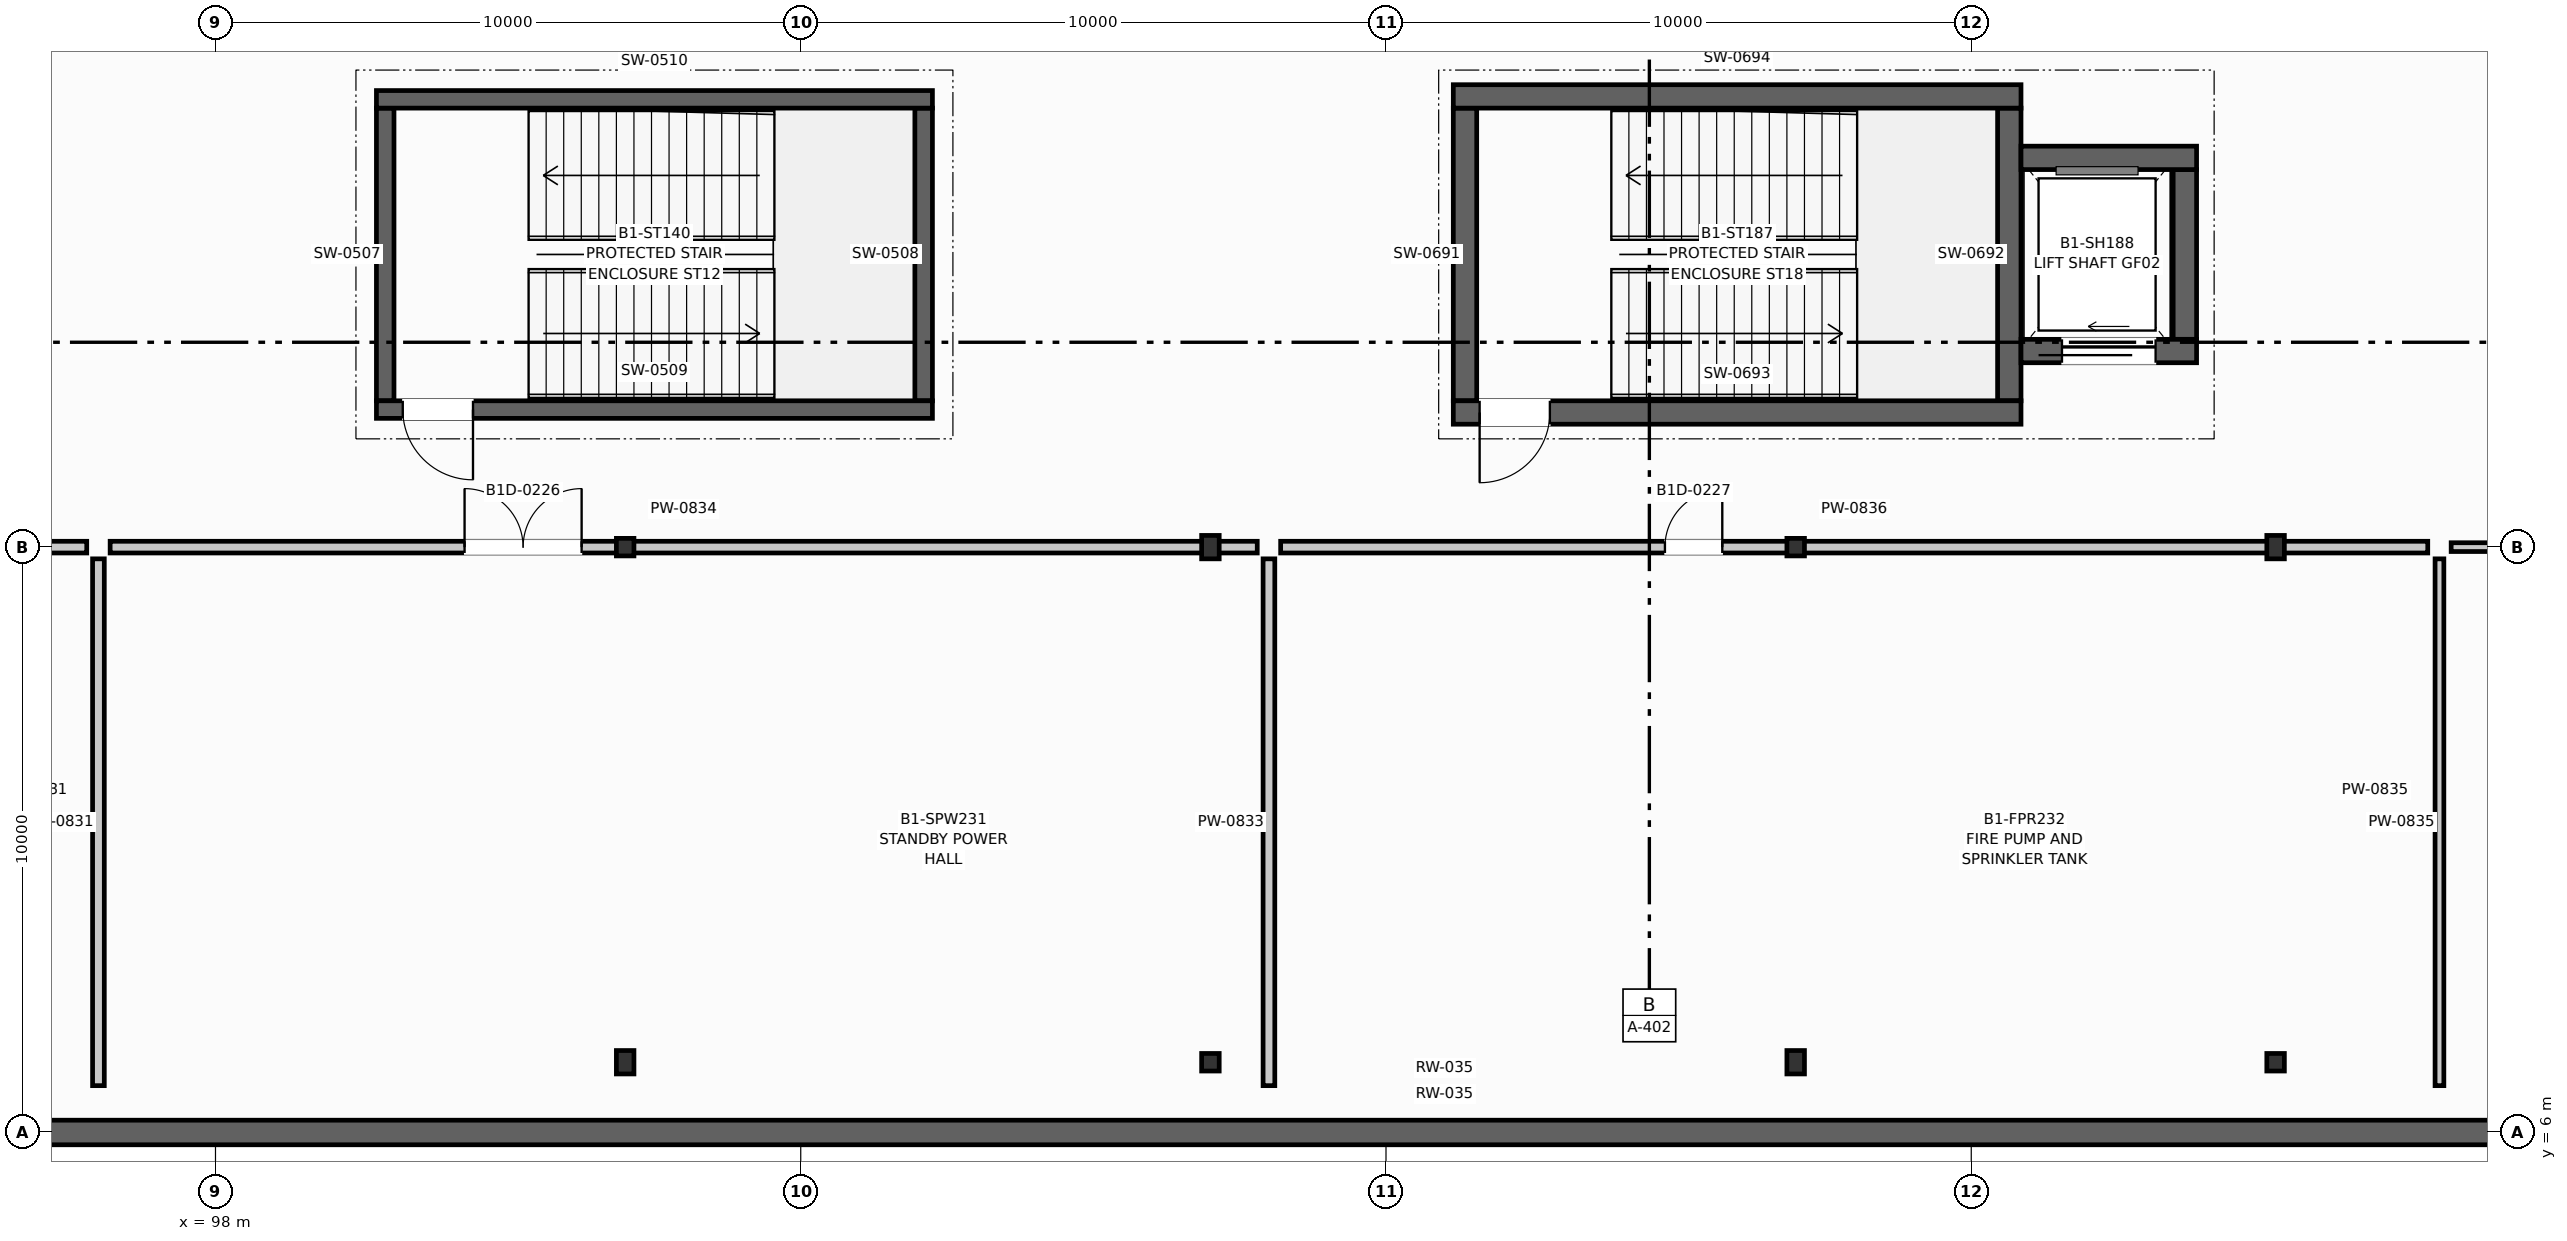
"""IFC4 building model, lengths in metres.
Left out: names, types, materials, properties, quantities, classifications, styles, units other than length and angle.
Written with IfcOpenShell. Run it as: python <this file> out.ifc"""

import sys

from ifc_helpers import new_model, si_unit, direction, frame, frame_2d, origin, origin_2d, place, context, subcontext, project, spatial, rectangle, i_section, extrude, element, fill, save


model = new_model("IFC4")
c1 = context("Model", 3, precision=1e-05, world=origin(), true_north=direction((0.0, 1.0)))
c2 = subcontext(c1, "Body", "Model", "MODEL_VIEW")
j1 = project(units=[si_unit("LENGTHUNIT", "METRE"), si_unit("PLANEANGLEUNIT", "RADIAN")], contexts=[c1])
p1 = place(None, origin())
s1 = spatial("IfcSite", under=j1, at=p1, CompositionType="ELEMENT")
p2 = place(p1, origin())
s2 = spatial("IfcBuilding", under=s1, at=p2, CompositionType="ELEMENT")
p3 = place(p2, frame((0.0, 0.0, -4.5)))
s3 = spatial("IfcBuildingStorey", under=s2, at=p3, CompositionType="ELEMENT", Elevation=-4.5)
p4 = place(p3, frame((105.0, 7.2, -0.55), z_axis=(0.0, 0.0, 1.0), x_axis=(1.0, 0.0, 0.0)))
e1 = element("IfcColumn", 1, at=p4, inside=s3, PredefinedType="COLUMN", context=c2, shape_type="SweptSolid", body=[
    extrude(i_section(OverallWidth=0.3, OverallDepth=0.4, WebThickness=0.013, FlangeThickness=0.024, at=origin_2d()), origin(), (0.0, 0.0, 1.0), 5.05),
])
for number, where, z_axis, x_axis in (
    (2, (105.0, 16.0, -0.55), (0.0, 0.0, 1.0), (1.0, 0.0, 0.0)),
    (3, (115.0, 7.2, -0.55), (0.0, 0.0, 1.0), (1.0, 0.0, 0.0)),
):
    element("IfcColumn", number, at=place(p3, frame(where, z_axis=z_axis, x_axis=x_axis)), inside=s3, PredefinedType="COLUMN", context=c2, shape_type="SweptSolid", body=[
        extrude(i_section(OverallWidth=0.3, OverallDepth=0.3, WebThickness=0.011, FlangeThickness=0.019, at=origin_2d()), origin(), (0.0, 0.0, 1.0), 5.05),
    ])
for number, where, z_axis, x_axis in (
    (4, (115.0, 16.0, -0.55), (0.0, 0.0, 1.0), (1.0, 0.0, 0.0)),
    (5, (125.0, 7.2, -0.55), (0.0, 0.0, 1.0), (1.0, 0.0, 0.0)),
):
    element("IfcColumn", number, at=place(p3, frame(where, z_axis=z_axis, x_axis=x_axis)), inside=s3, PredefinedType="COLUMN", context=c2, shape_type="SweptSolid", body=[
        extrude(i_section(OverallWidth=0.3, OverallDepth=0.4, WebThickness=0.013, FlangeThickness=0.024, at=origin_2d()), origin(), (0.0, 0.0, 1.0), 5.05),
    ])
for number, where, z_axis, x_axis in (
    (6, (125.0, 16.0, -0.55), (0.0, 0.0, 1.0), (1.0, 0.0, 0.0)),
    (7, (133.2, 7.2, -0.55), (0.0, 0.0, 1.0), (1.0, 0.0, 0.0)),
):
    element("IfcColumn", number, at=place(p3, frame(where, z_axis=z_axis, x_axis=x_axis)), inside=s3, PredefinedType="COLUMN", context=c2, shape_type="SweptSolid", body=[
        extrude(i_section(OverallWidth=0.3, OverallDepth=0.3, WebThickness=0.011, FlangeThickness=0.019, at=origin_2d()), origin(), (0.0, 0.0, 1.0), 5.05),
    ])
p5 = place(p3, frame((133.2, 16.0, -0.55), z_axis=(0.0, 0.0, 1.0), x_axis=(1.0, 0.0, 0.0)))
e8 = element("IfcColumn", 8, at=p5, inside=s3, PredefinedType="COLUMN", context=c2, shape_type="SweptSolid", body=[
    extrude(i_section(OverallWidth=0.3, OverallDepth=0.4, WebThickness=0.013, FlangeThickness=0.024, at=origin_2d()), origin(), (0.0, 0.0, 1.0), 5.05),
])
p6 = place(p3, frame((74.0, 6.0, 0.0), z_axis=(0.0, 0.0, 1.0), x_axis=(1.0, 0.0, 0.0)))
e9 = element("IfcWall", 9, at=p6, inside=s3, PredefinedType="USERDEFINED", context=c2, shape_type="SweptSolid", body=[
    extrude(rectangle(XDim=90.0, YDim=0.42, at=frame_2d((45.0, 0.0))), origin(), (0.0, 0.0, 1.0), 4.2),
])
for number, where, z_axis, x_axis in (
    (10, (100.9, 18.5, 0.0), (0.0, 0.0, 1.0), (0.0, 1.0, 0.0)),
    (11, (110.1, 18.5, 0.0), (0.0, 0.0, 1.0), (0.0, 1.0, 0.0)),
):
    element("IfcWall", number, at=place(p3, frame(where, z_axis=z_axis, x_axis=x_axis)), inside=s3, PredefinedType="SHEAR", context=c2, shape_type="SweptSolid", body=[
        extrude(rectangle(XDim=5.0, YDim=0.3, at=frame_2d((2.5, 0.0))), origin(), (0.0, 0.0, 1.0), 4.2),
    ])
p7 = place(p3, frame((100.75, 18.35, 0.0), z_axis=(0.0, 0.0, 1.0), x_axis=(1.0, 0.0, 0.0)))
e12 = element("IfcWall", 12, at=p7, inside=s3, PredefinedType="SHEAR", context=c2, shape_type="SweptSolid", body=[
    extrude(rectangle(XDim=9.5, YDim=0.3, at=frame_2d((4.75, 0.0))), origin(), (0.0, 0.0, 1.0), 4.2),
])
p8 = place(p7, frame((0.45, 0.0, 0.0)))
e13 = element("IfcOpeningElement", 13, at=p8, cuts=e12, PredefinedType="OPENING", context=c2, shape_type="SweptSolid", body=[
    extrude(rectangle(XDim=1.2, YDim=2.2, at=frame_2d((0.6, 1.1))), frame((0.0, 0.16, 0.0), z_axis=(0.0, -1.0, 0.0), x_axis=(1.0, 0.0, 0.0)), (0.0, 0.0, 1.0), 0.32),
])
p9 = place(p3, frame((100.75, 23.65, 0.0), z_axis=(0.0, 0.0, 1.0), x_axis=(1.0, 0.0, 0.0)))
e14 = element("IfcWall", 14, at=p9, inside=s3, PredefinedType="SHEAR", context=c2, shape_type="SweptSolid", body=[
    extrude(rectangle(XDim=9.5, YDim=0.3, at=frame_2d((4.75, 0.0))), origin(), (0.0, 0.0, 1.0), 4.2),
])
for number, where, z_axis, x_axis in (
    (15, (119.35, 18.5, 0.0), (0.0, 0.0, 1.0), (0.0, 1.0, 0.0)),
    (16, (128.65, 18.5, 0.0), (0.0, 0.0, 1.0), (0.0, 1.0, 0.0)),
):
    element("IfcWall", number, at=place(p3, frame(where, z_axis=z_axis, x_axis=x_axis)), inside=s3, PredefinedType="SHEAR", context=c2, shape_type="SweptSolid", body=[
        extrude(rectangle(XDim=5.0, YDim=0.4, at=frame_2d((2.5, 0.0))), origin(), (0.0, 0.0, 1.0), 4.2),
    ])
p10 = place(p3, frame((119.15, 18.3, 0.0), z_axis=(0.0, 0.0, 1.0), x_axis=(1.0, 0.0, 0.0)))
e17 = element("IfcWall", 17, at=p10, inside=s3, PredefinedType="SHEAR", context=c2, shape_type="SweptSolid", body=[
    extrude(rectangle(XDim=9.7, YDim=0.4, at=frame_2d((4.85, 0.0))), origin(), (0.0, 0.0, 1.0), 4.2),
])
p11 = place(p10, frame((0.45, 0.0, 0.0)))
e18 = element("IfcOpeningElement", 18, at=p11, cuts=e17, PredefinedType="OPENING", context=c2, shape_type="SweptSolid", body=[
    extrude(rectangle(XDim=1.2, YDim=2.2, at=frame_2d((0.6, 1.1))), frame((0.0, 0.21, 0.0), z_axis=(0.0, -1.0, 0.0), x_axis=(1.0, 0.0, 0.0)), (0.0, 0.0, 1.0), 0.42),
])
p12 = place(p3, frame((119.15, 23.7, 0.0), z_axis=(0.0, 0.0, 1.0), x_axis=(1.0, 0.0, 0.0)))
e19 = element("IfcWall", 19, at=p12, inside=s3, PredefinedType="SHEAR", context=c2, shape_type="SweptSolid", body=[
    extrude(rectangle(XDim=9.7, YDim=0.4, at=frame_2d((4.85, 0.0))), origin(), (0.0, 0.0, 1.0), 4.2),
])
p13 = place(p3, frame((131.65, 19.55, 0.0), z_axis=(0.0, 0.0, 1.0), x_axis=(0.0, 1.0, 0.0)))
e20 = element("IfcWall", 20, at=p13, inside=s3, PredefinedType="SHEAR", context=c2, shape_type="SweptSolid", body=[
    extrude(rectangle(XDim=2.9, YDim=0.4, at=frame_2d((1.45, 0.0))), origin(), (0.0, 0.0, 1.0), 4.2),
])
p14 = place(p3, frame((128.85, 19.35, 0.0), z_axis=(0.0, 0.0, 1.0), x_axis=(1.0, 0.0, 0.0)))
e21 = element("IfcWall", 21, at=p14, inside=s3, PredefinedType="SHEAR", context=c2, shape_type="SweptSolid", body=[
    extrude(rectangle(XDim=3.0, YDim=0.4, at=frame_2d((1.5, 0.0))), origin(), (0.0, 0.0, 1.0), 4.2),
])
p15 = place(p14, frame((0.7, 0.0, 0.0)))
e22 = element("IfcOpeningElement", 22, at=p15, cuts=e21, PredefinedType="OPENING", context=c2, shape_type="SweptSolid", body=[
    extrude(rectangle(XDim=1.6, YDim=2.35, at=frame_2d((0.8, 1.175))), frame((0.0, 0.21, 0.0), z_axis=(0.0, -1.0, 0.0), x_axis=(1.0, 0.0, 0.0)), (0.0, 0.0, 1.0), 0.42),
])
p16 = place(p3, frame((128.85, 22.65, 0.0), z_axis=(0.0, 0.0, 1.0), x_axis=(1.0, 0.0, 0.0)))
e23 = element("IfcWall", 23, at=p16, inside=s3, PredefinedType="SHEAR", context=c2, shape_type="SweptSolid", body=[
    extrude(rectangle(XDim=3.0, YDim=0.4, at=frame_2d((1.5, 0.0))), origin(), (0.0, 0.0, 1.0), 4.2),
])
p17 = place(p3, frame((96.0, 6.8, 0.0), z_axis=(0.0, 0.0, 1.0), x_axis=(0.0, 1.0, 0.0)))
e24 = element("IfcWall", 24, at=p17, inside=s3, PredefinedType="PARTITIONING", context=c2, shape_type="SweptSolid", body=[
    extrude(rectangle(XDim=9.0, YDim=0.2, at=frame_2d((4.5, 0.0))), origin(), (0.0, 0.0, 1.0), 3.22),
])
p18 = place(p3, frame((75.5, 16.0, 0.0), z_axis=(0.0, 0.0, 1.0), x_axis=(1.0, 0.0, 0.0)))
e25 = element("IfcWall", 25, at=p18, inside=s3, PredefinedType="PARTITIONING", context=c2, shape_type="SweptSolid", body=[
    extrude(rectangle(XDim=20.3, YDim=0.2, at=frame_2d((10.15, 0.0))), origin(), (0.0, 0.0, 1.0), 3.22),
])
p19 = place(p18, frame((6.308, 0.0, 0.0)))
e26 = element("IfcOpeningElement", 26, at=p19, cuts=e25, PredefinedType="OPENING", context=c2, shape_type="SweptSolid", body=[
    extrude(rectangle(XDim=2.0, YDim=2.25, at=frame_2d((1.0, 1.125))), frame((0.0, 0.11, 0.0), z_axis=(0.0, -1.0, 0.0), x_axis=(1.0, 0.0, 0.0)), (0.0, 0.0, 1.0), 0.22),
])
p20 = place(p3, frame((116.0, 6.8, 0.0), z_axis=(0.0, 0.0, 1.0), x_axis=(0.0, 1.0, 0.0)))
e27 = element("IfcWall", 27, at=p20, inside=s3, PredefinedType="PARTITIONING", context=c2, shape_type="SweptSolid", body=[
    extrude(rectangle(XDim=9.0, YDim=0.2, at=frame_2d((4.5, 0.0))), origin(), (0.0, 0.0, 1.0), 3.22),
])
p21 = place(p3, frame((96.2, 16.0, 0.0), z_axis=(0.0, 0.0, 1.0), x_axis=(1.0, 0.0, 0.0)))
e28 = element("IfcWall", 28, at=p21, inside=s3, PredefinedType="PARTITIONING", context=c2, shape_type="SweptSolid", body=[
    extrude(rectangle(XDim=19.6, YDim=0.2, at=frame_2d((9.8, 0.0))), origin(), (0.0, 0.0, 1.0), 3.22),
])
p22 = place(p21, frame((6.056, 0.0, 0.0)))
e29 = element("IfcOpeningElement", 29, at=p22, cuts=e28, PredefinedType="OPENING", context=c2, shape_type="SweptSolid", body=[
    extrude(rectangle(XDim=2.0, YDim=2.25, at=frame_2d((1.0, 1.125))), frame((0.0, 0.11, 0.0), z_axis=(0.0, -1.0, 0.0), x_axis=(1.0, 0.0, 0.0)), (0.0, 0.0, 1.0), 0.22),
])
p23 = place(p3, frame((136.0, 6.8, 0.0), z_axis=(0.0, 0.0, 1.0), x_axis=(0.0, 1.0, 0.0)))
e30 = element("IfcWall", 30, at=p23, inside=s3, PredefinedType="PARTITIONING", context=c2, shape_type="SweptSolid", body=[
    extrude(rectangle(XDim=9.0, YDim=0.15, at=frame_2d((4.5, 0.0))), origin(), (0.0, 0.0, 1.0), 3.22),
])
p24 = place(p3, frame((116.2, 16.0, 0.0), z_axis=(0.0, 0.0, 1.0), x_axis=(1.0, 0.0, 0.0)))
e31 = element("IfcWall", 31, at=p24, inside=s3, PredefinedType="PARTITIONING", context=c2, shape_type="SweptSolid", body=[
    extrude(rectangle(XDim=19.6, YDim=0.2, at=frame_2d((9.8, 0.0))), origin(), (0.0, 0.0, 1.0), 3.22),
])
p25 = place(p24, frame((6.566, 0.0, 0.0)))
e32 = element("IfcOpeningElement", 32, at=p25, cuts=e31, PredefinedType="OPENING", context=c2, shape_type="SweptSolid", body=[
    extrude(rectangle(XDim=0.98, YDim=2.15, at=frame_2d((0.49, 1.075))), frame((0.0, 0.11, 0.0), z_axis=(0.0, -1.0, 0.0), x_axis=(1.0, 0.0, 0.0)), (0.0, 0.0, 1.0), 0.22),
])
p26 = place(p3, frame((136.2, 16.0, 0.0), z_axis=(0.0, 0.0, 1.0), x_axis=(1.0, 0.0, 0.0)))
e33 = element("IfcWall", 33, at=p26, inside=s3, PredefinedType="PARTITIONING", context=c2, shape_type="SweptSolid", body=[
    extrude(rectangle(XDim=26.6, YDim=0.15, at=frame_2d((13.3, 0.0))), origin(), (0.0, 0.0, 1.0), 3.22),
])
p27 = place(p26, frame((12.79, 0.0, 0.0)))
e34 = element("IfcOpeningElement", 34, at=p27, cuts=e33, PredefinedType="OPENING", context=c2, shape_type="SweptSolid", body=[
    extrude(rectangle(XDim=1.02, YDim=2.15, at=frame_2d((0.51, 1.075))), frame((0.0, 0.085, 0.0), z_axis=(0.0, -1.0, 0.0), x_axis=(1.0, 0.0, 0.0)), (0.0, 0.0, 1.0), 0.17),
])
p28 = place(p8, frame((1.2, 0.0, 0.0), z_axis=(0.0, 0.0, 1.0), x_axis=(-1.0, 0.0, 0.0)))
e35 = element("IfcDoor", 35, at=p28, inside=s3, OperationType="SINGLE_SWING_RIGHT", PredefinedType="DOOR", context=c2, shape_type="SweptSolid", body=[
    extrude(rectangle(XDim=1.2, YDim=2.2, at=frame_2d((0.6, 1.1))), frame((0.0, 0.025, 0.0), z_axis=(0.0, -1.0, 0.0), x_axis=(1.0, 0.0, 0.0)), (0.0, 0.0, 1.0), 0.05),
])
fill(e13, e35)
p29 = place(p11, frame((1.2, 0.0, 0.0), z_axis=(0.0, 0.0, 1.0), x_axis=(-1.0, 0.0, 0.0)))
e36 = element("IfcDoor", 36, at=p29, inside=s3, OperationType="SINGLE_SWING_LEFT", PredefinedType="DOOR", context=c2, shape_type="SweptSolid", body=[
    extrude(rectangle(XDim=1.2, YDim=2.2, at=frame_2d((0.6, 1.1))), frame((0.0, 0.025, 0.0), z_axis=(0.0, -1.0, 0.0), x_axis=(1.0, 0.0, 0.0)), (0.0, 0.0, 1.0), 0.05),
])
fill(e18, e36)
p30 = place(p15, origin())
e37 = element("IfcDoor", 37, at=p30, inside=s3, OperationType="SLIDING_TO_LEFT", PredefinedType="DOOR", context=c2, shape_type="SweptSolid", body=[
    extrude(rectangle(XDim=1.6, YDim=2.35, at=frame_2d((0.8, 1.175))), frame((0.0, 0.025, 0.0), z_axis=(0.0, -1.0, 0.0), x_axis=(1.0, 0.0, 0.0)), (0.0, 0.0, 1.0), 0.05),
])
fill(e22, e37)
p31 = place(p22, origin())
e38 = element("IfcDoor", 38, at=p31, inside=s3, OperationType="DOUBLE_DOOR_SINGLE_SWING", PredefinedType="DOOR", context=c2, shape_type="SweptSolid", body=[
    extrude(rectangle(XDim=2.0, YDim=2.25, at=frame_2d((1.0, 1.125))), frame((0.0, 0.025, 0.0), z_axis=(0.0, -1.0, 0.0), x_axis=(1.0, 0.0, 0.0)), (0.0, 0.0, 1.0), 0.05),
])
fill(e29, e38)
p32 = place(p25, origin())
e39 = element("IfcDoor", 39, at=p32, inside=s3, OperationType="SINGLE_SWING_RIGHT", PredefinedType="DOOR", context=c2, shape_type="SweptSolid", body=[
    extrude(rectangle(XDim=0.98, YDim=2.15, at=frame_2d((0.49, 1.075))), frame((0.0, 0.025, 0.0), z_axis=(0.0, -1.0, 0.0), x_axis=(1.0, 0.0, 0.0)), (0.0, 0.0, 1.0), 0.05),
])
fill(e32, e39)
save(model, sys.argv[1])
